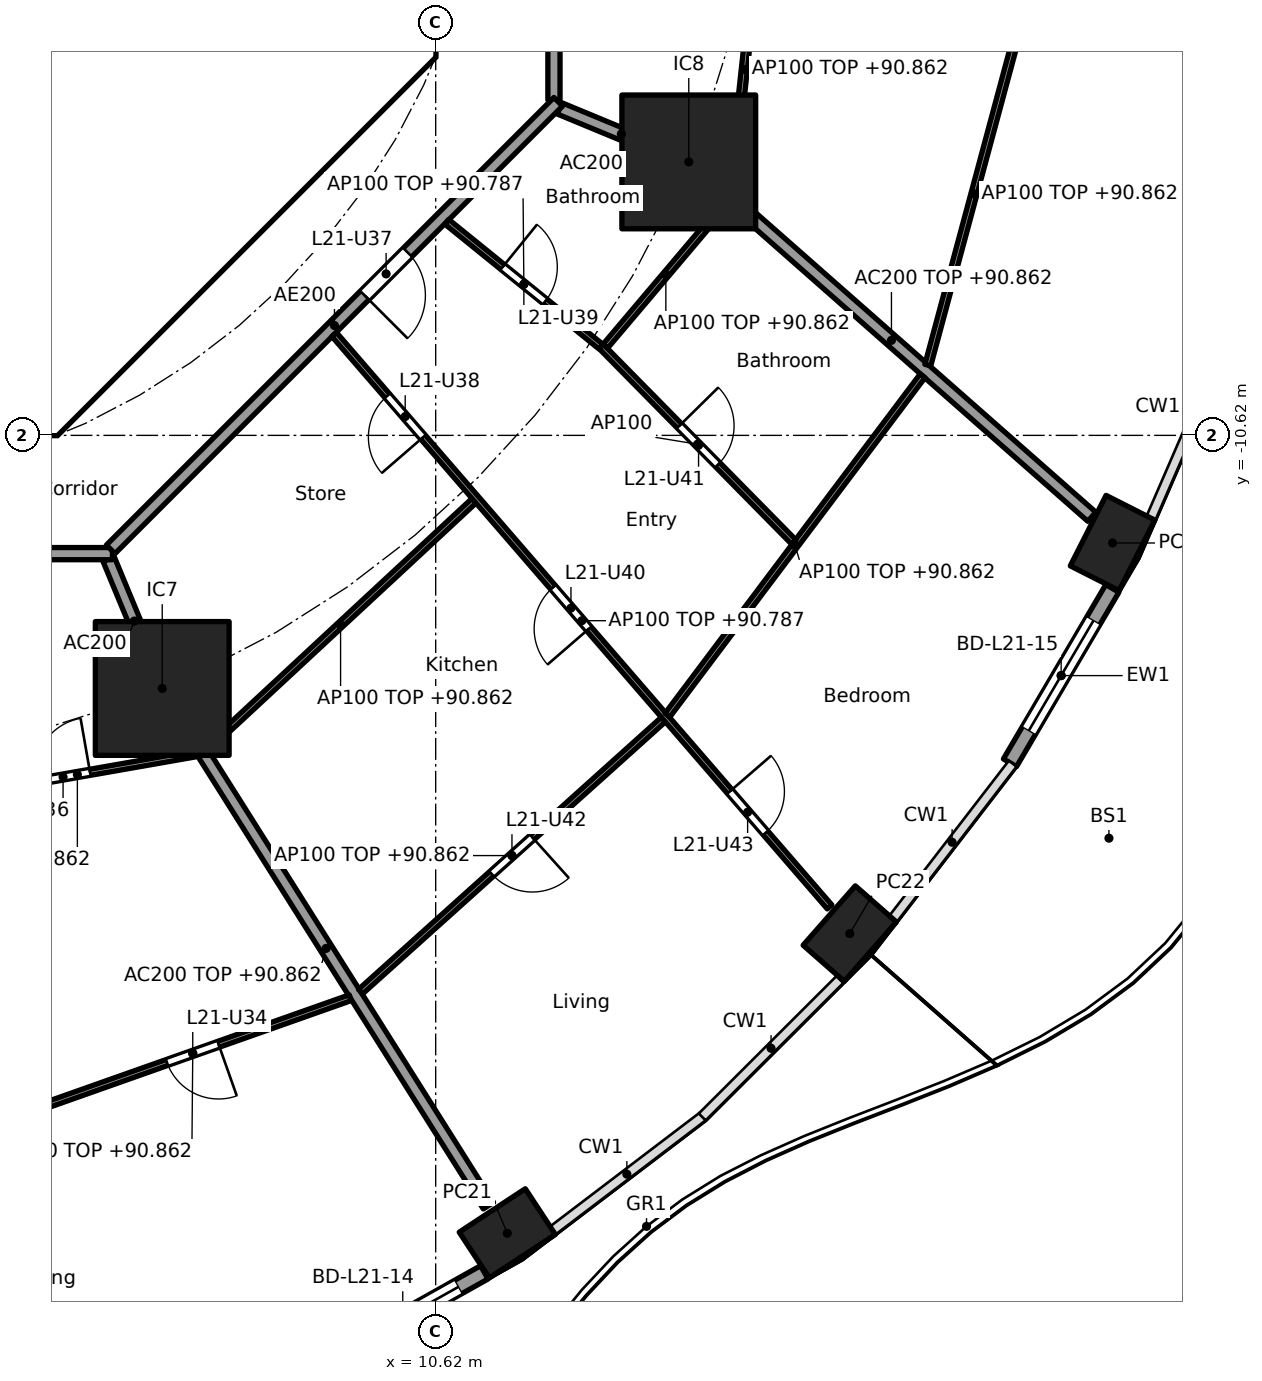
"""IFC4 building model, lengths in metres.
Left out: names, types, materials, properties, quantities, classifications, styles, units other than length and angle.
Written with IfcOpenShell. Run it as: python <this file> out.ifc"""

import sys

from ifc_helpers import new_model, si_unit, direction, frame, frame_2d, origin, origin_2d, place, context, subcontext, project, spatial, polyline, rectangle, hollow_rectangle, outline, extrude, element, fill, save


model = new_model("IFC4")
c1 = context("Model", 3, precision=1e-05, world=origin(), true_north=direction((0.0, 1.0)))
c2 = subcontext(c1, "Body", "Model", "MODEL_VIEW")
j1 = project(units=[si_unit("LENGTHUNIT", "METRE"), si_unit("PLANEANGLEUNIT", "RADIAN")], contexts=[c1])
p1 = place(None, origin())
s1 = spatial("IfcSite", under=j1, at=p1, CompositionType="ELEMENT")
p2 = place(p1, origin())
s2 = spatial("IfcBuilding", under=s1, at=p2, CompositionType="ELEMENT")
p3 = place(p2, frame((0.0, 0.0, 88.1)))
s3 = spatial("IfcBuildingStorey", under=s2, at=p3, CompositionType="ELEMENT", Elevation=88.1)
for number, where, z_axis, x_axis in (
    (1, (11.798, -23.742, 0.0), (0.0, 0.0, 1.0), (0.836, 0.549, 0.0)),
    (2, (17.43, -18.813, 0.0), (0.0, 0.0, 1.0), (0.66, 0.751, 0.0)),
    (3, (21.751, -12.39, 0.0), (0.0, 0.0, 1.0), (0.452, 0.892, 0.0)),
):
    element("IfcColumn", number, at=place(p3, frame(where, z_axis=z_axis, x_axis=x_axis)), inside=s3, PredefinedType="COLUMN", context=c2, shape_type="SweptSolid", body=[
        extrude(hollow_rectangle(XDim=1.3, YDim=0.9, WallThickness=0.045, at=origin_2d()), origin(), (0.0, 0.0, 1.0), 3.7),
    ])
for number, where, z_axis, x_axis in (
    (4, (6.123, -14.782, 0.0), (0.0, 0.0, 1.0), (1.0, 0.0, 0.0)),
    (5, (14.782, -6.123, 0.0), (0.0, 0.0, 1.0), (1.0, 0.0, 0.0)),
):
    element("IfcColumn", number, at=place(p3, frame(where, z_axis=z_axis, x_axis=x_axis)), inside=s3, PredefinedType="COLUMN", context=c2, shape_type="SweptSolid", body=[
        extrude(rectangle(XDim=2.2, YDim=2.2, at=origin_2d()), origin(), (0.0, 0.0, 1.0), 3.7),
    ])
p4 = place(p3, frame((11.419, -24.384, 0.0), z_axis=(0.0, 0.0, 1.0), x_axis=(-0.872071158476, -0.489379090843, 0.0)))
e6 = element("IfcWall", 6, at=p4, inside=s3, PredefinedType="SOLIDWALL", context=c2, shape_type="SweptSolid", body=[
    extrude(rectangle(XDim=3.076, YDim=0.25, at=frame_2d((1.538, 0.0))), origin(), (0.0, 0.0, 1.0), 3.44),
])
p5 = place(p4, frame((0.488, 0.0, 0.0)))
e7 = element("IfcOpeningElement", 7, at=p5, cuts=e6, PredefinedType="OPENING", context=c2, shape_type="SweptSolid", body=[
    extrude(rectangle(XDim=2.1, YDim=2.4, at=frame_2d((1.05, 1.2))), frame((0.0, 0.135, 0.0), z_axis=(0.0, -1.0, 0.0), x_axis=(1.0, 0.0, 0.0)), (0.0, 0.0, 1.0), 0.27),
])
p6 = place(p3, frame((21.748, -13.137, 0.0), z_axis=(0.0, 0.0, 1.0), x_axis=(-0.506297921217, -0.862358634775, 0.0)))
e8 = element("IfcWall", 8, at=p6, inside=s3, PredefinedType="SOLIDWALL", context=c2, shape_type="SweptSolid", body=[
    extrude(rectangle(XDim=3.325, YDim=0.25, at=frame_2d((1.662, 0.0))), origin(), (0.0, 0.0, 1.0), 3.44),
])
p7 = place(p6, frame((0.612, 0.0, 0.0)))
e9 = element("IfcOpeningElement", 9, at=p7, cuts=e8, PredefinedType="OPENING", context=c2, shape_type="SweptSolid", body=[
    extrude(rectangle(XDim=2.1, YDim=2.4, at=frame_2d((1.05, 1.2))), frame((0.0, 0.135, 0.0), z_axis=(0.0, -1.0, 0.0), x_axis=(1.0, 0.0, 0.0)), (0.0, 0.0, 1.0), 0.27),
])
p8 = place(p3, frame((4.613, -9.988, 0.0), z_axis=(0.0, 0.0, 1.0), x_axis=(0.707106781187, 0.707106781187, 0.0)))
e10 = element("IfcWall", 10, at=p8, inside=s3, PredefinedType="SHEAR", context=c2, shape_type="SweptSolid", body=[
    extrude(rectangle(XDim=7.602, YDim=0.6, at=frame_2d((3.801, 0.0))), origin(), (0.0, 0.0, 1.0), 3.44),
])
p9 = place(p8, frame((3.201, 0.0, 0.0)))
e11 = element("IfcOpeningElement", 11, at=p9, cuts=e10, PredefinedType="OPENING", context=c2, shape_type="SweptSolid", body=[
    extrude(rectangle(XDim=1.2, YDim=2.1, at=frame_2d((0.6, 1.05))), frame((0.0, 0.31, 0.0), z_axis=(0.0, -1.0, 0.0), x_axis=(1.0, 0.0, 0.0)), (0.0, 0.0, 1.0), 0.62),
])
p10 = place(p3, origin())
e12 = element("IfcWall", 12, at=p10, inside=s3, PredefinedType="SHEAR", context=c2, shape_type="SweptSolid", body=[
    extrude(outline(polyline([(-4.152, -10.025), (4.152, -10.025), (4.401, -9.776), (4.825, -10.2), (4.401, -10.625), (-4.401, -10.625), (-4.825, -10.2), (-4.401, -9.776), (-4.152, -10.025)])), origin(), (0.0, 0.0, 1.0), 3.44),
])
p11 = place(p3, origin())
e13 = element("IfcWall", 13, at=p11, inside=s3, PredefinedType="SHEAR", context=c2, shape_type="SweptSolid", body=[
    extrude(outline(polyline([(9.776, -4.401), (10.025, -4.152), (10.025, -3.801), (10.025, 4.152), (9.776, 4.401), (10.2, 4.825), (10.625, 4.401), (10.625, -4.401), (10.2, -4.825), (9.776, -4.401)])), origin(), (0.0, 0.0, 1.0), 3.44),
])
p12 = place(p3, frame((5.243, -12.657, 0.0), z_axis=(0.0, 0.0, 1.0), x_axis=(0.382747093259, -0.923853160736, 0.0)))
e14 = element("IfcWall", 14, at=p12, inside=s3, PredefinedType="PARTITIONING", context=c2, shape_type="SweptSolid", body=[
    extrude(rectangle(XDim=2.2, YDim=0.2, at=frame_2d((1.1, 0.0))), origin(), (0.0, 0.0, 1.0), 3.44),
])
p13 = place(p3, frame((6.15, -14.824, 0.0), z_axis=(0.0, 0.0, 1.0), x_axis=(0.533492589682, -0.845804739142, 0.0)))
e15 = element("IfcWall", 15, at=p13, inside=s3, PredefinedType="PARTITIONING", context=c2, shape_type="SweptSolid", body=[
    extrude(rectangle(XDim=10.006, YDim=0.2, at=frame_2d((5.003, 0.0))), origin(), (0.0, 0.0, 1.0), 2.762),
])
p14 = place(p3, frame((12.657, -5.243, 0.0), z_axis=(0.0, 0.0, 1.0), x_axis=(0.923876145736, -0.382691608661, 0.0)))
e16 = element("IfcWall", 16, at=p14, inside=s3, PredefinedType="PARTITIONING", context=c2, shape_type="SweptSolid", body=[
    extrude(rectangle(XDim=2.2, YDim=0.2, at=frame_2d((1.1, 0.0))), origin(), (0.0, 0.0, 1.0), 3.44),
])
p15 = place(p3, frame((14.82, -6.156, 0.0), z_axis=(0.0, 0.0, 1.0), x_axis=(0.750582231659, -0.660777052808, 0.0)))
e17 = element("IfcWall", 17, at=p15, inside=s3, PredefinedType="PARTITIONING", context=c2, shape_type="SweptSolid", body=[
    extrude(rectangle(XDim=8.781, YDim=0.2, at=frame_2d((4.391, 0.0))), origin(), (0.0, 0.0, 1.0), 2.762),
])
p16 = place(p3, frame((12.565, -5.104, 0.0), z_axis=(0.0, 0.0, 1.0), x_axis=(0.0, 1.0, 0.0)))
e18 = element("IfcWall", 18, at=p16, inside=s3, PredefinedType="PARTITIONING", context=c2, shape_type="SweptSolid", body=[
    extrude(rectangle(XDim=10.209, YDim=0.2, at=frame_2d((5.104, 0.0))), origin(), (0.0, 0.0, 1.0), 3.44),
])
p17 = place(p16, frame((6.339, 0.0, 0.0)))
e19 = element("IfcOpeningElement", 19, at=p17, cuts=e18, PredefinedType="OPENING", context=c2, shape_type="SweptSolid", body=[
    extrude(rectangle(XDim=1.0, YDim=2.1, at=frame_2d((0.5, 1.05))), frame((0.0, 0.11, 0.0), z_axis=(0.0, -1.0, 0.0), x_axis=(1.0, 0.0, 0.0)), (0.0, 0.0, 1.0), 0.22),
])
p18 = place(p3, frame((-5.104, -12.565, 0.0), z_axis=(0.0, 0.0, 1.0), x_axis=(1.0, 0.0, 0.0)))
e20 = element("IfcWall", 20, at=p18, inside=s3, PredefinedType="PARTITIONING", context=c2, shape_type="SweptSolid", body=[
    extrude(rectangle(XDim=10.409, YDim=0.2, at=frame_2d((5.205, 0.0))), origin(), (0.0, 0.0, 1.0), 3.44),
])
p19 = place(p3, frame((5.275, -12.494, 0.0), z_axis=(0.0, 0.0, 1.0), x_axis=(0.707106781187, 0.707106781187, 0.0)))
e21 = element("IfcWall", 21, at=p19, inside=s3, PredefinedType="PARTITIONING", context=c2, shape_type="SweptSolid", body=[
    extrude(rectangle(XDim=10.409, YDim=0.2, at=frame_2d((5.205, 0.0))), origin(), (0.0, 0.0, 1.0), 3.44),
])
p20 = place(p19, frame((5.906, 0.0, 0.0)))
e22 = element("IfcOpeningElement", 22, at=p20, cuts=e21, PredefinedType="OPENING", context=c2, shape_type="SweptSolid", body=[
    extrude(rectangle(XDim=1.0, YDim=2.1, at=frame_2d((0.5, 1.05))), frame((0.0, 0.11, 0.0), z_axis=(0.0, -1.0, 0.0), x_axis=(1.0, 0.0, 0.0)), (0.0, 0.0, 1.0), 0.22),
])
p21 = place(p3, frame((2.765, -16.541, 0.0), z_axis=(0.0, 0.0, 1.0), x_axis=(0.984998714702, 0.172561676036, 0.0)))
e23 = element("IfcWall", 23, at=p21, inside=s3, PredefinedType="PARTITIONING", context=c2, shape_type="SweptSolid", body=[
    extrude(rectangle(XDim=3.984, YDim=0.1, at=frame_2d((1.992, 0.0))), origin(), (0.0, 0.0, 1.0), 2.762),
])
p22 = place(p21, frame((1.304, 0.0, 0.0)))
e24 = element("IfcOpeningElement", 24, at=p22, cuts=e23, PredefinedType="OPENING", context=c2, shape_type="SweptSolid", body=[
    extrude(rectangle(XDim=0.9, YDim=2.1, at=frame_2d((0.45, 1.05))), frame((0.0, 0.06, 0.0), z_axis=(0.0, -1.0, 0.0), x_axis=(1.0, 0.0, 0.0)), (0.0, 0.0, 1.0), 0.12),
])
p23 = place(p3, frame((4.034, -21.698, 0.0), z_axis=(0.0, 0.0, 1.0), x_axis=(0.942861482644, 0.33318497047, 0.0)))
e25 = element("IfcWall", 25, at=p23, inside=s3, PredefinedType="PARTITIONING", context=c2, shape_type="SweptSolid", body=[
    extrude(rectangle(XDim=5.495, YDim=0.1, at=frame_2d((2.748, 0.0))), origin(), (0.0, 0.0, 1.0), 2.762),
])
p24 = place(p23, frame((2.297, 0.0, 0.0)))
e26 = element("IfcOpeningElement", 26, at=p24, cuts=e25, PredefinedType="OPENING", context=c2, shape_type="SweptSolid", body=[
    extrude(rectangle(XDim=0.9, YDim=2.1, at=frame_2d((0.45, 1.05))), frame((0.0, 0.06, 0.0), z_axis=(0.0, -1.0, 0.0), x_axis=(1.0, 0.0, 0.0)), (0.0, 0.0, 1.0), 0.12),
])
p25 = place(p3, frame((6.861, -15.768, 0.0), z_axis=(0.0, 0.0, 1.0), x_axis=(0.733011256509, 0.680216508056, 0.0)))
e27 = element("IfcWall", 27, at=p25, inside=s3, PredefinedType="PARTITIONING", context=c2, shape_type="SweptSolid", body=[
    extrude(rectangle(XDim=5.989, YDim=0.1, at=frame_2d((2.994, 0.0))), origin(), (0.0, 0.0, 1.0), 2.762),
])
p26 = place(p3, frame((9.384, -19.768, 0.0), z_axis=(0.0, 0.0, 1.0), x_axis=(0.74387407395, 0.668319805262, 0.0)))
e28 = element("IfcWall", 28, at=p26, inside=s3, PredefinedType="PARTITIONING", context=c2, shape_type="SweptSolid", body=[
    extrude(rectangle(XDim=6.695, YDim=0.1, at=frame_2d((3.348, 0.0))), origin(), (0.0, 0.0, 1.0), 2.762),
])
p27 = place(p26, frame((2.898, 0.0, 0.0)))
e29 = element("IfcOpeningElement", 29, at=p27, cuts=e28, PredefinedType="OPENING", context=c2, shape_type="SweptSolid", body=[
    extrude(rectangle(XDim=0.9, YDim=2.1, at=frame_2d((0.45, 1.05))), frame((0.0, 0.06, 0.0), z_axis=(0.0, -1.0, 0.0), x_axis=(1.0, 0.0, 0.0)), (0.0, 0.0, 1.0), 0.12),
])
p28 = place(p3, frame((8.95, -8.96, 0.0), z_axis=(0.0, 0.0, 1.0), x_axis=(0.65441081073, -0.756139200676, 0.0)))
e30 = element("IfcWall", 30, at=p28, inside=s3, PredefinedType="PARTITIONING", context=c2, shape_type="SweptSolid", body=[
    extrude(rectangle(XDim=12.451, YDim=0.1, at=frame_2d((6.226, 0.0))), origin(), (0.0, 0.0, 1.0), 2.687),
])
p29 = place(p28, frame((1.336, 0.0, 0.0)))
e31 = element("IfcOpeningElement", 31, at=p29, cuts=e30, PredefinedType="OPENING", context=c2, shape_type="SweptSolid", body=[
    extrude(rectangle(XDim=0.9, YDim=2.1, at=frame_2d((0.45, 1.05))), frame((0.0, 0.06, 0.0), z_axis=(0.0, -1.0, 0.0), x_axis=(1.0, 0.0, 0.0)), (0.0, 0.0, 1.0), 0.12),
])
p30 = place(p28, frame((5.501, 0.0, 0.0)))
e32 = element("IfcOpeningElement", 32, at=p30, cuts=e30, PredefinedType="OPENING", context=c2, shape_type="SweptSolid", body=[
    extrude(rectangle(XDim=0.9, YDim=2.1, at=frame_2d((0.45, 1.05))), frame((0.0, 0.06, 0.0), z_axis=(0.0, -1.0, 0.0), x_axis=(1.0, 0.0, 0.0)), (0.0, 0.0, 1.0), 0.12),
])
p31 = place(p28, frame((9.941, 0.0, 0.0)))
e33 = element("IfcOpeningElement", 33, at=p31, cuts=e30, PredefinedType="OPENING", context=c2, shape_type="SweptSolid", body=[
    extrude(rectangle(XDim=0.9, YDim=2.1, at=frame_2d((0.45, 1.05))), frame((0.0, 0.06, 0.0), z_axis=(0.0, -1.0, 0.0), x_axis=(1.0, 0.0, 0.0)), (0.0, 0.0, 1.0), 0.12),
])
p32 = place(p3, frame((14.432, -15.219, 0.0), z_axis=(0.0, 0.0, 1.0), x_axis=(0.601001256685, 0.799248077548, 0.0)))
e34 = element("IfcWall", 34, at=p32, inside=s3, PredefinedType="PARTITIONING", context=c2, shape_type="SweptSolid", body=[
    extrude(rectangle(XDim=6.98, YDim=0.1, at=frame_2d((3.49, 0.0))), origin(), (0.0, 0.0, 1.0), 2.762),
])
p33 = place(p3, frame((10.802, -7.107, 0.0), z_axis=(0.0, 0.0, 1.0), x_axis=(0.776992142502, -0.62951029419, 0.0)))
e35 = element("IfcWall", 35, at=p33, inside=s3, PredefinedType="PARTITIONING", context=c2, shape_type="SweptSolid", body=[
    extrude(rectangle(XDim=3.263, YDim=0.1, at=frame_2d((1.631, 0.0))), origin(), (0.0, 0.0, 1.0), 2.687),
])
p34 = place(p33, frame((1.181, 0.0, 0.0)))
e36 = element("IfcOpeningElement", 36, at=p34, cuts=e35, PredefinedType="OPENING", context=c2, shape_type="SweptSolid", body=[
    extrude(rectangle(XDim=0.9, YDim=2.1, at=frame_2d((0.45, 1.05))), frame((0.0, 0.06, 0.0), z_axis=(0.0, -1.0, 0.0), x_axis=(1.0, 0.0, 0.0)), (0.0, 0.0, 1.0), 0.12),
])
p35 = place(p3, frame((13.341, -9.157, 0.0), z_axis=(0.0, 0.0, 1.0), x_axis=(0.701624526877, -0.712546856904, 0.0)))
e37 = element("IfcWall", 37, at=p35, inside=s3, PredefinedType="PARTITIONING", context=c2, shape_type="SweptSolid", body=[
    extrude(rectangle(XDim=4.515, YDim=0.1, at=frame_2d((2.258, 0.0))), origin(), (0.0, 0.0, 1.0), 3.44),
])
p36 = place(p35, frame((1.833, 0.0, 0.0)))
e38 = element("IfcOpeningElement", 38, at=p36, cuts=e37, PredefinedType="OPENING", context=c2, shape_type="SweptSolid", body=[
    extrude(rectangle(XDim=0.9, YDim=2.1, at=frame_2d((0.45, 1.05))), frame((0.0, 0.06, 0.0), z_axis=(0.0, -1.0, 0.0), x_axis=(1.0, 0.0, 0.0)), (0.0, 0.0, 1.0), 0.12),
])
p37 = place(p3, frame((13.409, -9.155, 0.0), z_axis=(0.0, 0.0, 1.0), x_axis=(0.646130325831, 0.763227097293, 0.0)))
e39 = element("IfcWall", 39, at=p37, inside=s3, PredefinedType="PARTITIONING", context=c2, shape_type="SweptSolid", body=[
    extrude(rectangle(XDim=3.084, YDim=0.1, at=frame_2d((1.542, 0.0))), origin(), (0.0, 0.0, 1.0), 2.762),
])
p38 = place(p3, frame((15.477, -6.625, 0.0), z_axis=(0.0, 0.0, 1.0), x_axis=(0.107561928907, 0.994198386365, 0.0)))
e40 = element("IfcWall", 40, at=p38, inside=s3, PredefinedType="PARTITIONING", context=c2, shape_type="SweptSolid", body=[
    extrude(rectangle(XDim=4.072, YDim=0.1, at=frame_2d((2.036, 0.0))), origin(), (0.0, 0.0, 1.0), 2.762),
])
p39 = place(p3, frame((18.713, -9.464, 0.0), z_axis=(0.0, 0.0, 1.0), x_axis=(0.260279646259, 0.965533275316, 0.0)))
e41 = element("IfcWall", 41, at=p39, inside=s3, PredefinedType="PARTITIONING", context=c2, shape_type="SweptSolid", body=[
    extrude(rectangle(XDim=5.833, YDim=0.1, at=frame_2d((2.917, 0.0))), origin(), (0.0, 0.0, 1.0), 2.762),
])
p40 = place(p5, origin())
e42 = element("IfcDoor", 42, at=p40, inside=s3, OperationType="SLIDING_TO_LEFT", PredefinedType="DOOR", context=c2, shape_type="SweptSolid", body=[
    extrude(rectangle(XDim=2.1, YDim=2.4, at=frame_2d((1.05, 1.2))), frame((0.0, 0.025, 0.0), z_axis=(0.0, -1.0, 0.0), x_axis=(1.0, 0.0, 0.0)), (0.0, 0.0, 1.0), 0.05),
])
fill(e7, e42)
p41 = place(p7, origin())
e43 = element("IfcDoor", 43, at=p41, inside=s3, OperationType="SLIDING_TO_LEFT", PredefinedType="DOOR", context=c2, shape_type="SweptSolid", body=[
    extrude(rectangle(XDim=2.1, YDim=2.4, at=frame_2d((1.05, 1.2))), frame((0.0, 0.025, 0.0), z_axis=(0.0, -1.0, 0.0), x_axis=(1.0, 0.0, 0.0)), (0.0, 0.0, 1.0), 0.05),
])
fill(e9, e43)
p42 = place(p9, origin())
e44 = element("IfcDoor", 44, at=p42, inside=s3, OperationType="SINGLE_SWING_LEFT", PredefinedType="DOOR", context=c2, shape_type="SweptSolid", body=[
    extrude(rectangle(XDim=1.2, YDim=2.1, at=frame_2d((0.6, 1.05))), frame((0.0, 0.025, 0.0), z_axis=(0.0, -1.0, 0.0), x_axis=(1.0, 0.0, 0.0)), (0.0, 0.0, 1.0), 0.05),
])
fill(e11, e44)
p43 = place(p24, frame((0.9, 0.0, 0.0), x_axis=(-1.0, 0.0, 0.0)))
e45 = element("IfcDoor", 45, at=p43, inside=s3, OperationType="SINGLE_SWING_LEFT", PredefinedType="DOOR", context=c2, shape_type="SweptSolid", body=[
    extrude(rectangle(XDim=0.9, YDim=2.1, at=frame_2d((0.45, 1.05))), frame((0.0, 0.025, 0.0), z_axis=(0.0, -1.0, 0.0), x_axis=(1.0, 0.0, 0.0)), (0.0, 0.0, 1.0), 0.05),
])
fill(e26, e45)
p44 = place(p22, origin())
e46 = element("IfcDoor", 46, at=p44, inside=s3, OperationType="SINGLE_SWING_RIGHT", PredefinedType="DOOR", context=c2, shape_type="SweptSolid", body=[
    extrude(rectangle(XDim=0.9, YDim=2.1, at=frame_2d((0.45, 1.05))), frame((0.0, 0.025, 0.0), z_axis=(0.0, -1.0, 0.0), x_axis=(1.0, 0.0, 0.0)), (0.0, 0.0, 1.0), 0.05),
])
fill(e24, e46)
p45 = place(p20, frame((1.0, 0.0, 0.0), x_axis=(-1.0, 0.0, 0.0)))
e47 = element("IfcDoor", 47, at=p45, inside=s3, OperationType="SINGLE_SWING_RIGHT", PredefinedType="DOOR", context=c2, shape_type="SweptSolid", body=[
    extrude(rectangle(XDim=1.0, YDim=2.1, at=frame_2d((0.5, 1.05))), frame((0.0, 0.025, 0.0), z_axis=(0.0, -1.0, 0.0), x_axis=(1.0, 0.0, 0.0)), (0.0, 0.0, 1.0), 0.05),
])
fill(e22, e47)
p46 = place(p29, frame((0.9, 0.0, 0.0), x_axis=(-1.0, 0.0, 0.0)))
e48 = element("IfcDoor", 48, at=p46, inside=s3, OperationType="SINGLE_SWING_LEFT", PredefinedType="DOOR", context=c2, shape_type="SweptSolid", body=[
    extrude(rectangle(XDim=0.9, YDim=2.1, at=frame_2d((0.45, 1.05))), frame((0.0, 0.025, 0.0), z_axis=(0.0, -1.0, 0.0), x_axis=(1.0, 0.0, 0.0)), (0.0, 0.0, 1.0), 0.05),
])
fill(e31, e48)
p47 = place(p34, origin())
e49 = element("IfcDoor", 49, at=p47, inside=s3, OperationType="SINGLE_SWING_LEFT", PredefinedType="DOOR", context=c2, shape_type="SweptSolid", body=[
    extrude(rectangle(XDim=0.9, YDim=2.1, at=frame_2d((0.45, 1.05))), frame((0.0, 0.025, 0.0), z_axis=(0.0, -1.0, 0.0), x_axis=(1.0, 0.0, 0.0)), (0.0, 0.0, 1.0), 0.05),
])
fill(e36, e49)
p48 = place(p30, frame((0.9, 0.0, 0.0), x_axis=(-1.0, 0.0, 0.0)))
e50 = element("IfcDoor", 50, at=p48, inside=s3, OperationType="SINGLE_SWING_LEFT", PredefinedType="DOOR", context=c2, shape_type="SweptSolid", body=[
    extrude(rectangle(XDim=0.9, YDim=2.1, at=frame_2d((0.45, 1.05))), frame((0.0, 0.025, 0.0), z_axis=(0.0, -1.0, 0.0), x_axis=(1.0, 0.0, 0.0)), (0.0, 0.0, 1.0), 0.05),
])
fill(e32, e50)
p49 = place(p36, origin())
e51 = element("IfcDoor", 51, at=p49, inside=s3, OperationType="SINGLE_SWING_LEFT", PredefinedType="DOOR", context=c2, shape_type="SweptSolid", body=[
    extrude(rectangle(XDim=0.9, YDim=2.1, at=frame_2d((0.45, 1.05))), frame((0.0, 0.025, 0.0), z_axis=(0.0, -1.0, 0.0), x_axis=(1.0, 0.0, 0.0)), (0.0, 0.0, 1.0), 0.05),
])
fill(e38, e51)
p50 = place(p27, frame((0.9, 0.0, 0.0), x_axis=(-1.0, 0.0, 0.0)))
e52 = element("IfcDoor", 52, at=p50, inside=s3, OperationType="SINGLE_SWING_LEFT", PredefinedType="DOOR", context=c2, shape_type="SweptSolid", body=[
    extrude(rectangle(XDim=0.9, YDim=2.1, at=frame_2d((0.45, 1.05))), frame((0.0, 0.025, 0.0), z_axis=(0.0, -1.0, 0.0), x_axis=(1.0, 0.0, 0.0)), (0.0, 0.0, 1.0), 0.05),
])
fill(e29, e52)
p51 = place(p31, origin())
e53 = element("IfcDoor", 53, at=p51, inside=s3, OperationType="SINGLE_SWING_LEFT", PredefinedType="DOOR", context=c2, shape_type="SweptSolid", body=[
    extrude(rectangle(XDim=0.9, YDim=2.1, at=frame_2d((0.45, 1.05))), frame((0.0, 0.025, 0.0), z_axis=(0.0, -1.0, 0.0), x_axis=(1.0, 0.0, 0.0)), (0.0, 0.0, 1.0), 0.05),
])
fill(e33, e53)
save(model, sys.argv[1])
